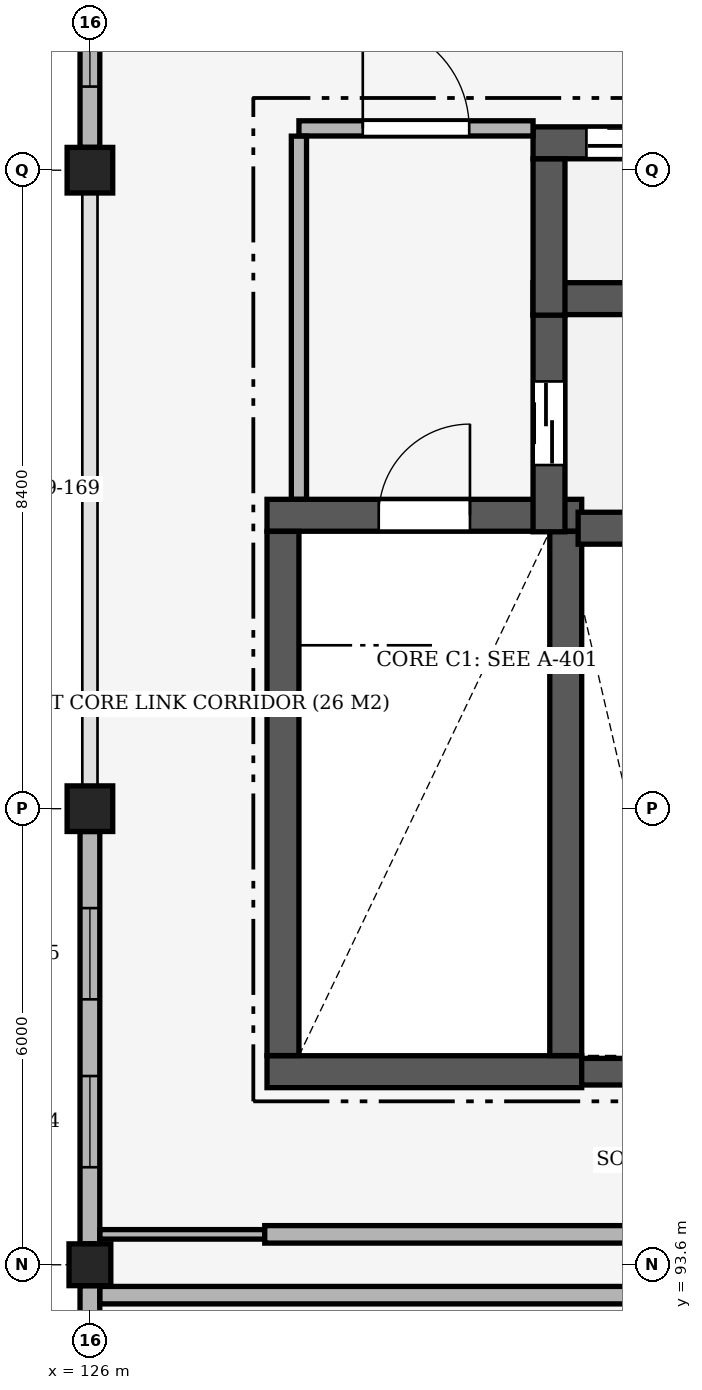
"""IFC4 building model, lengths in metres.
Left out: names, types, materials, properties, quantities, classifications, styles, units other than length and angle.
Written with IfcOpenShell. Run it as: python <this file> out.ifc"""

import sys

from ifc_helpers import new_model, si_unit, direction, frame, frame_2d, origin, origin_2d, place, context, subcontext, project, spatial, rectangle, extrude, element, fill, save


model = new_model("IFC4")
c1 = context("Model", 3, precision=1e-05, world=origin(), true_north=direction((0.0, 1.0)))
c2 = subcontext(c1, "Body", "Model", "MODEL_VIEW")
j1 = project(units=[si_unit("LENGTHUNIT", "METRE"), si_unit("PLANEANGLEUNIT", "RADIAN")], contexts=[c1])
p1 = place(None, origin())
s1 = spatial("IfcSite", under=j1, at=p1, CompositionType="ELEMENT")
p2 = place(p1, origin())
s2 = spatial("IfcBuilding", under=s1, at=p2, CompositionType="ELEMENT")
p3 = place(p2, frame((0.0, 0.0, 42.0)))
s3 = spatial("IfcBuildingStorey", under=s2, at=p3, CompositionType="ELEMENT", Elevation=42.0)
p4 = place(p3, frame((126.0, 93.6, 0.0), z_axis=(0.0, 0.0, 1.0), x_axis=(1.0, 0.0, 0.0)))
e1 = element("IfcColumn", 1, at=p4, inside=s3, PredefinedType="COLUMN", context=c2, shape_type="SweptSolid", body=[
    extrude(rectangle(XDim=0.55, YDim=0.55, at=origin_2d()), origin(), (0.0, 0.0, 1.0), 3.9),
])
for number, where, z_axis, x_axis in (
    (2, (126.0, 99.6, 0.0), (0.0, 0.0, 1.0), (1.0, 0.0, 0.0)),
    (3, (126.0, 108.0, 0.0), (0.0, 0.0, 1.0), (1.0, 0.0, 0.0)),
):
    element("IfcColumn", number, at=place(p3, frame(where, z_axis=z_axis, x_axis=x_axis)), inside=s3, PredefinedType="COLUMN", context=c2, shape_type="SweptSolid", body=[
        extrude(rectangle(XDim=0.6, YDim=0.6, at=origin_2d()), origin(), (0.0, 0.0, 1.0), 3.9),
    ])
p5 = place(p3, frame((126.0, 85.475, 0.0), z_axis=(0.0, 0.0, 1.0), x_axis=(0.0, 1.0, 0.0)))
e4 = element("IfcWall", 4, at=p5, inside=s3, PredefinedType="SOLIDWALL", context=c2, shape_type="SweptSolid", body=[
    extrude(rectangle(XDim=7.85, YDim=0.26, at=frame_2d((3.925, 0.0))), origin(), (0.0, 0.0, 1.0), 2.96),
])
p6 = place(p5, frame((1.817, 0.0, 1.71)))
e5 = element("IfcOpeningElement", 5, at=p6, cuts=e4, PredefinedType="OPENING", context=c2, shape_type="SweptSolid", body=[
    extrude(rectangle(XDim=1.2, YDim=0.9, at=frame_2d((0.6, 0.45))), frame((0.0, 0.145, 0.0), z_axis=(0.0, -1.0, 0.0), x_axis=(1.0, 0.0, 0.0)), (0.0, 0.0, 1.0), 0.29),
])
p7 = place(p5, frame((4.833, 0.0, 1.71)))
e6 = element("IfcOpeningElement", 6, at=p7, cuts=e4, PredefinedType="OPENING", context=c2, shape_type="SweptSolid", body=[
    extrude(rectangle(XDim=1.2, YDim=0.9, at=frame_2d((0.6, 0.45))), frame((0.0, 0.145, 0.0), z_axis=(0.0, -1.0, 0.0), x_axis=(1.0, 0.0, 0.0)), (0.0, 0.0, 1.0), 0.29),
])
p8 = place(p3, frame((126.0, 93.875, 0.0), z_axis=(0.0, 0.0, 1.0), x_axis=(0.0, 1.0, 0.0)))
e7 = element("IfcWall", 7, at=p8, inside=s3, PredefinedType="SOLIDWALL", context=c2, shape_type="SweptSolid", body=[
    extrude(rectangle(XDim=5.425, YDim=0.26, at=frame_2d((2.712, 0.0))), origin(), (0.0, 0.0, 1.0), 3.11),
])
p9 = place(p8, frame((1.008, 0.0, 1.86)))
e8 = element("IfcOpeningElement", 8, at=p9, cuts=e7, PredefinedType="OPENING", context=c2, shape_type="SweptSolid", body=[
    extrude(rectangle(XDim=1.2, YDim=0.9, at=frame_2d((0.6, 0.45))), frame((0.0, 0.145, 0.0), z_axis=(0.0, -1.0, 0.0), x_axis=(1.0, 0.0, 0.0)), (0.0, 0.0, 1.0), 0.29),
])
p10 = place(p8, frame((3.217, 0.0, 1.86)))
e9 = element("IfcOpeningElement", 9, at=p10, cuts=e7, PredefinedType="OPENING", context=c2, shape_type="SweptSolid", body=[
    extrude(rectangle(XDim=1.2, YDim=0.9, at=frame_2d((0.6, 0.45))), frame((0.0, 0.145, 0.0), z_axis=(0.0, -1.0, 0.0), x_axis=(1.0, 0.0, 0.0)), (0.0, 0.0, 1.0), 0.29),
])
p11 = place(p3, frame((126.0, 108.3, 0.0), z_axis=(0.0, 0.0, 1.0), x_axis=(0.0, 1.0, 0.0)))
e10 = element("IfcWall", 10, at=p11, inside=s3, PredefinedType="SOLIDWALL", context=c2, shape_type="SweptSolid", body=[
    extrude(rectangle(XDim=4.8, YDim=0.26, at=frame_2d((2.4, 0.0))), origin(), (0.0, 0.0, 1.0), 3.11),
])
p12 = place(p11, frame((0.8, 0.0, 1.86)))
e11 = element("IfcOpeningElement", 11, at=p12, cuts=e10, PredefinedType="OPENING", context=c2, shape_type="SweptSolid", body=[
    extrude(rectangle(XDim=1.2, YDim=0.9, at=frame_2d((0.6, 0.45))), frame((0.0, 0.145, 0.0), z_axis=(0.0, -1.0, 0.0), x_axis=(1.0, 0.0, 0.0)), (0.0, 0.0, 1.0), 0.29),
])
p13 = place(p3, frame((128.33, 103.46, 0.0), z_axis=(0.0, 0.0, 1.0), x_axis=(1.0, 0.0, 0.0)))
e12 = element("IfcWall", 12, at=p13, inside=s3, PredefinedType="SHEAR", context=c2, shape_type="SweptSolid", body=[
    extrude(rectangle(XDim=4.14, YDim=0.42, at=frame_2d((2.07, 0.0))), origin(), (0.0, 0.0, 1.0), 3.66),
])
p14 = place(p13, frame((1.47, 0.0, 0.0)))
e13 = element("IfcOpeningElement", 13, at=p14, cuts=e12, PredefinedType="OPENING", context=c2, shape_type="SweptSolid", body=[
    extrude(rectangle(XDim=1.2, YDim=2.2, at=frame_2d((0.6, 1.1))), frame((0.0, 0.225, 0.0), z_axis=(0.0, -1.0, 0.0), x_axis=(1.0, 0.0, 0.0)), (0.0, 0.0, 1.0), 0.45),
])
p15 = place(p3, frame((128.33, 96.14, 0.0), z_axis=(0.0, 0.0, 1.0), x_axis=(1.0, 0.0, 0.0)))
e14 = element("IfcWall", 14, at=p15, inside=s3, PredefinedType="SHEAR", context=c2, shape_type="SweptSolid", body=[
    extrude(rectangle(XDim=4.14, YDim=0.42, at=frame_2d((2.07, 0.0))), origin(), (0.0, 0.0, 1.0), 3.66),
])
for number, where, z_axis, x_axis in (
    (15, (128.54, 96.352, 0.0), (0.0, 0.0, 1.0), (0.0, 1.0, 0.0)),
    (16, (132.26, 96.352, 0.0), (0.0, 0.0, 1.0), (0.0, 1.0, 0.0)),
):
    element("IfcWall", number, at=place(p3, frame(where, z_axis=z_axis, x_axis=x_axis)), inside=s3, PredefinedType="SHEAR", context=c2, shape_type="SweptSolid", body=[
        extrude(rectangle(XDim=6.896, YDim=0.42, at=frame_2d((3.448, 0.0))), origin(), (0.0, 0.0, 1.0), 3.66),
    ])
p16 = place(p3, frame((132.423, 103.29, 0.0), z_axis=(0.0, 0.0, 1.0), x_axis=(1.0, 0.0, 0.0)))
e17 = element("IfcWall", 17, at=p16, inside=s3, PredefinedType="SHEAR", context=c2, shape_type="SweptSolid", body=[
    extrude(rectangle(XDim=1.847, YDim=0.42, at=frame_2d((0.923, 0.0))), origin(), (0.0, 0.0, 1.0), 3.9),
])
p17 = place(p3, frame((131.83, 106.31, 0.0), z_axis=(0.0, 0.0, 1.0), x_axis=(1.0, 0.0, 0.0)))
e18 = element("IfcWall", 18, at=p17, inside=s3, PredefinedType="SHEAR", context=c2, shape_type="SweptSolid", body=[
    extrude(rectangle(XDim=2.44, YDim=0.42, at=frame_2d((1.22, 0.0))), origin(), (0.0, 0.0, 1.0), 3.9),
])
p18 = place(p3, frame((132.04, 103.243, 0.0), z_axis=(0.0, 0.0, 1.0), x_axis=(0.0, 1.0, 0.0)))
e19 = element("IfcWall", 19, at=p18, inside=s3, PredefinedType="SHEAR", context=c2, shape_type="SweptSolid", body=[
    extrude(rectangle(XDim=2.855, YDim=0.42, at=frame_2d((1.427, 0.0))), origin(), (0.0, 0.0, 1.0), 3.9),
])
p19 = place(p18, frame((0.878, 0.0, 0.0)))
e20 = element("IfcOpeningElement", 20, at=p19, cuts=e19, PredefinedType="OPENING", context=c2, shape_type="SweptSolid", body=[
    extrude(rectangle(XDim=1.1, YDim=2.15, at=frame_2d((0.55, 1.075))), frame((0.0, 0.225, 0.0), z_axis=(0.0, -1.0, 0.0), x_axis=(1.0, 0.0, 0.0)), (0.0, 0.0, 1.0), 0.45),
])
p20 = place(p3, frame((131.83, 108.36, 0.0), z_axis=(0.0, 0.0, 1.0), x_axis=(1.0, 0.0, 0.0)))
e21 = element("IfcWall", 21, at=p20, inside=s3, PredefinedType="SHEAR", context=c2, shape_type="SweptSolid", body=[
    extrude(rectangle(XDim=2.505, YDim=0.42, at=frame_2d((1.252, 0.0))), origin(), (0.0, 0.0, 1.0), 3.9),
])
p21 = place(p20, frame((0.702, 0.0, 0.0)))
e22 = element("IfcOpeningElement", 22, at=p21, cuts=e21, PredefinedType="OPENING", context=c2, shape_type="SweptSolid", body=[
    extrude(rectangle(XDim=1.1, YDim=2.15, at=frame_2d((0.55, 1.075))), frame((0.0, 0.225, 0.0), z_axis=(0.0, -1.0, 0.0), x_axis=(1.0, 0.0, 0.0)), (0.0, 0.0, 1.0), 0.45),
])
p22 = place(p3, frame((132.04, 106.093, 0.0), z_axis=(0.0, 0.0, 1.0), x_axis=(0.0, 1.0, 0.0)))
e23 = element("IfcWall", 23, at=p22, inside=s3, PredefinedType="SHEAR", context=c2, shape_type="SweptSolid", body=[
    extrude(rectangle(XDim=2.055, YDim=0.42, at=frame_2d((1.027, 0.0))), origin(), (0.0, 0.0, 1.0), 3.9),
])
p23 = place(p3, frame((132.47, 96.14, 0.0), z_axis=(0.0, 0.0, 1.0), x_axis=(1.0, 0.0, 0.0)))
e24 = element("IfcWall", 24, at=p23, inside=s3, PredefinedType="SHEAR", context=c2, shape_type="SweptSolid", body=[
    extrude(rectangle(XDim=1.8, YDim=0.35, at=frame_2d((0.9, 0.0))), origin(), (0.0, 0.0, 1.0), 3.66),
])
p24 = place(p3, frame((126.132, 93.2, 0.0), z_axis=(0.0, 0.0, 1.0), x_axis=(1.0, 0.0, 0.0)))
e25 = element("IfcWall", 25, at=p24, inside=s3, PredefinedType="SOLIDWALL", context=c2, shape_type="SweptSolid", body=[
    extrude(rectangle(XDim=12.668, YDim=0.23, at=frame_2d((6.334, 0.0))), origin(), (0.0, 0.0, 1.0), 2.96),
])
p25 = place(p3, frame((126.132, 94.0, 0.0), z_axis=(0.0, 0.0, 1.0), x_axis=(1.0, 0.0, 0.0)))
e26 = element("IfcWall", 26, at=p25, inside=s3, PredefinedType="PARTITIONING", context=c2, shape_type="SweptSolid", body=[
    extrude(rectangle(XDim=2.168, YDim=0.125, at=frame_2d((1.084, 0.0))), origin(), (0.0, 0.0, 1.0), 3.11),
])
p26 = place(p3, frame((128.3, 94.0, 0.0), z_axis=(0.0, 0.0, 1.0), x_axis=(1.0, 0.0, 0.0)))
e27 = element("IfcWall", 27, at=p26, inside=s3, PredefinedType="SOLIDWALL", context=c2, shape_type="SweptSolid", body=[
    extrude(rectangle(XDim=10.5, YDim=0.23, at=frame_2d((5.25, 0.0))), origin(), (0.0, 0.0, 1.0), 3.11),
])
p27 = place(p3, frame((128.75, 108.55, 0.0), z_axis=(0.0, 0.0, 1.0), x_axis=(1.0, 0.0, 0.0)))
e28 = element("IfcWall", 28, at=p27, inside=s3, PredefinedType="PARTITIONING", context=c2, shape_type="SweptSolid", body=[
    extrude(rectangle(XDim=3.08, YDim=0.2, at=frame_2d((1.54, 0.0))), origin(), (0.0, 0.0, 1.0), 3.66),
])
p28 = place(p27, frame((0.84, 0.0, 0.0)))
e29 = element("IfcOpeningElement", 29, at=p28, cuts=e28, PredefinedType="OPENING", context=c2, shape_type="SweptSolid", body=[
    extrude(rectangle(XDim=1.4, YDim=2.2, at=frame_2d((0.7, 1.1))), frame((0.0, 0.115, 0.0), z_axis=(0.0, -1.0, 0.0), x_axis=(1.0, 0.0, 0.0)), (0.0, 0.0, 1.0), 0.23),
])
p29 = place(p3, frame((128.75, 103.672, 0.0), z_axis=(0.0, 0.0, 1.0), x_axis=(0.0, 1.0, 0.0)))
e30 = element("IfcWall", 30, at=p29, inside=s3, PredefinedType="PARTITIONING", context=c2, shape_type="SweptSolid", body=[
    extrude(rectangle(XDim=4.776, YDim=0.2, at=frame_2d((2.388, 0.0))), origin(), (0.0, 0.0, 1.0), 2.96),
])
p30 = place(p9, origin())
e31 = element("IfcWindow", 31, at=p30, inside=s3, PartitioningType="SINGLE_PANEL", PredefinedType="WINDOW", context=c2, shape_type="SweptSolid", body=[
    extrude(rectangle(XDim=1.2, YDim=0.9, at=frame_2d((0.6, 0.45))), frame((0.0, 0.03, 0.0), z_axis=(0.0, -1.0, 0.0), x_axis=(1.0, 0.0, 0.0)), (0.0, 0.0, 1.0), 0.06),
])
fill(e8, e31)
p31 = place(p10, origin())
e32 = element("IfcWindow", 32, at=p31, inside=s3, PartitioningType="SINGLE_PANEL", PredefinedType="WINDOW", context=c2, shape_type="SweptSolid", body=[
    extrude(rectangle(XDim=1.2, YDim=0.9, at=frame_2d((0.6, 0.45))), frame((0.0, 0.03, 0.0), z_axis=(0.0, -1.0, 0.0), x_axis=(1.0, 0.0, 0.0)), (0.0, 0.0, 1.0), 0.06),
])
fill(e9, e32)
p32 = place(p12, origin())
e33 = element("IfcWindow", 33, at=p32, inside=s3, PartitioningType="SINGLE_PANEL", PredefinedType="WINDOW", context=c2, shape_type="SweptSolid", body=[
    extrude(rectangle(XDim=1.2, YDim=0.9, at=frame_2d((0.6, 0.45))), frame((0.0, 0.03, 0.0), z_axis=(0.0, -1.0, 0.0), x_axis=(1.0, 0.0, 0.0)), (0.0, 0.0, 1.0), 0.06),
])
fill(e11, e33)
p33 = place(p14, origin())
e34 = element("IfcDoor", 34, at=p33, inside=s3, OperationType="SINGLE_SWING_RIGHT", PredefinedType="DOOR", context=c2, shape_type="SweptSolid", body=[
    extrude(rectangle(XDim=1.2, YDim=2.2, at=frame_2d((0.6, 1.1))), frame((0.0, 0.025, 0.0), z_axis=(0.0, -1.0, 0.0), x_axis=(1.0, 0.0, 0.0)), (0.0, 0.0, 1.0), 0.05),
])
fill(e13, e34)
p34 = place(p19, origin())
e35 = element("IfcDoor", 35, at=p34, inside=s3, OperationType="DOUBLE_DOOR_SLIDING", PredefinedType="DOOR", context=c2, shape_type="SweptSolid", body=[
    extrude(rectangle(XDim=1.1, YDim=2.15, at=frame_2d((0.55, 1.075))), frame((0.0, 0.025, 0.0), z_axis=(0.0, -1.0, 0.0), x_axis=(1.0, 0.0, 0.0)), (0.0, 0.0, 1.0), 0.05),
])
fill(e20, e35)
p35 = place(p21, origin())
e36 = element("IfcDoor", 36, at=p35, inside=s3, OperationType="DOUBLE_DOOR_SLIDING", PredefinedType="DOOR", context=c2, shape_type="SweptSolid", body=[
    extrude(rectangle(XDim=1.1, YDim=2.15, at=frame_2d((0.55, 1.075))), frame((0.0, 0.025, 0.0), z_axis=(0.0, -1.0, 0.0), x_axis=(1.0, 0.0, 0.0)), (0.0, 0.0, 1.0), 0.05),
])
fill(e22, e36)
p36 = place(p28, origin())
e37 = element("IfcDoor", 37, at=p36, inside=s3, OperationType="SINGLE_SWING_LEFT", PredefinedType="DOOR", context=c2, shape_type="SweptSolid", body=[
    extrude(rectangle(XDim=1.4, YDim=2.2, at=frame_2d((0.7, 1.1))), frame((0.0, 0.025, 0.0), z_axis=(0.0, -1.0, 0.0), x_axis=(1.0, 0.0, 0.0)), (0.0, 0.0, 1.0), 0.05),
])
fill(e29, e37)
save(model, sys.argv[1])
